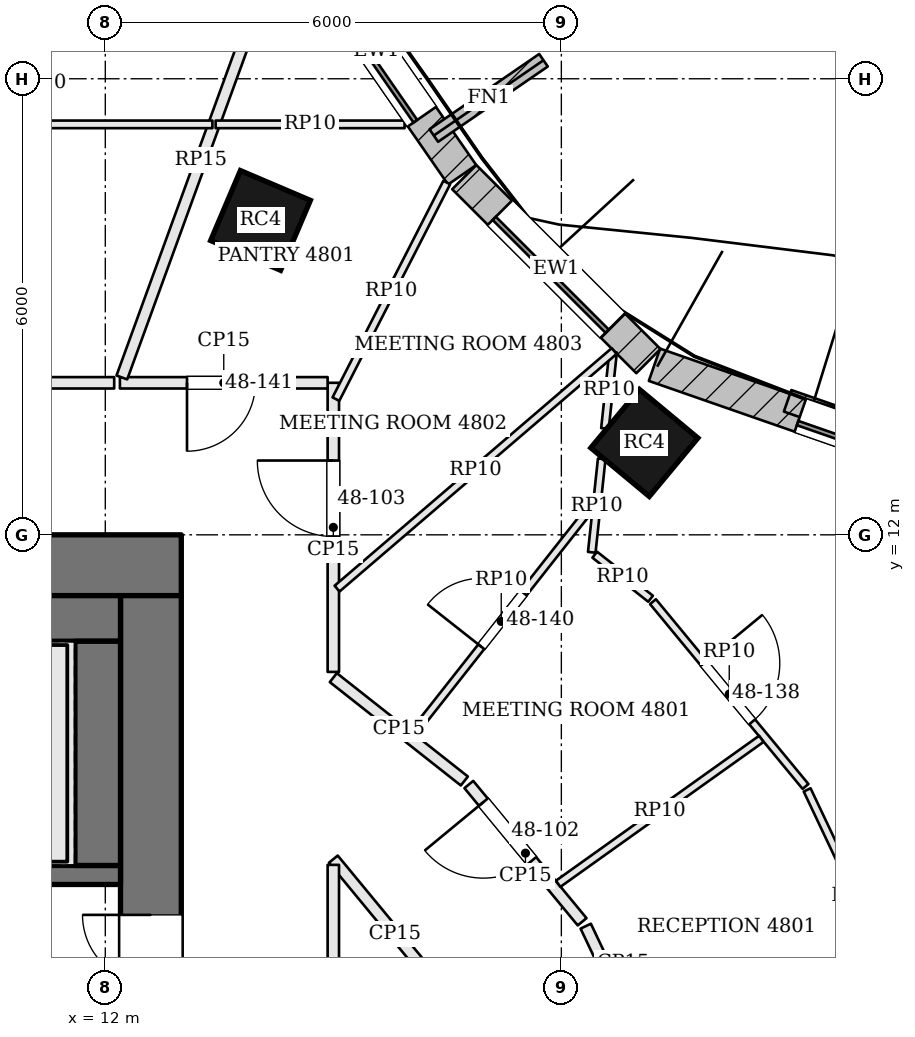
"""IFC4 building model, lengths in metres.
Left out: names, types, materials, properties, quantities, classifications, styles, units other than length and angle.
Written with IfcOpenShell. Run it as: python <this file> out.ifc"""

import sys

from ifc_helpers import new_model, si_unit, direction, frame, frame_2d, origin, origin_2d, place, context, subcontext, project, spatial, rectangle, extrude, element, fill, save


model = new_model("IFC4")
c1 = context("Model", 3, precision=1e-05, world=origin(), true_north=direction((0.0, 1.0)))
c2 = subcontext(c1, "Body", "Model", "MODEL_VIEW")
j1 = project(units=[si_unit("LENGTHUNIT", "METRE"), si_unit("PLANEANGLEUNIT", "RADIAN")], contexts=[c1])
p1 = place(None, origin())
s1 = spatial("IfcSite", under=j1, at=p1, CompositionType="ELEMENT")
p2 = place(p1, origin())
s2 = spatial("IfcBuilding", under=s1, at=p2, CompositionType="ELEMENT")
p3 = place(p2, frame((0.0, 0.0, 197.4)))
s3 = spatial("IfcBuildingStorey", under=s2, at=p3, CompositionType="ELEMENT", Elevation=197.4)
p4 = place(p3, frame((-13.0, 11.6, 0.0), z_axis=(0.0, 0.0, 1.0), x_axis=(1.0, 0.0, 0.0)))
e1 = element("IfcWall", 1, at=p4, inside=s3, PredefinedType="SHEAR", context=c2, shape_type="SweptSolid", body=[
    extrude(rectangle(XDim=26.0, YDim=0.8, at=frame_2d((13.0, 0.0))), origin(), (0.0, 0.0, 1.0), 3.9),
])
p5 = place(p4, frame((8.975, 0.0, 0.0)))
e2 = element("IfcOpeningElement", 2, at=p5, cuts=e1, PredefinedType="OPENING", context=c2, shape_type="SweptSolid", body=[
    extrude(rectangle(XDim=0.7, YDim=2.1, at=frame_2d((0.35, 1.05))), frame((0.0, 0.41, 0.0), z_axis=(0.0, -1.0, 0.0), x_axis=(1.0, 0.0, 0.0)), (0.0, 0.0, 1.0), 0.82),
])
p6 = place(p4, frame((11.025, 0.0, 0.0)))
e3 = element("IfcOpeningElement", 3, at=p6, cuts=e1, PredefinedType="OPENING", context=c2, shape_type="SweptSolid", body=[
    extrude(rectangle(XDim=0.7, YDim=2.1, at=frame_2d((0.35, 1.05))), frame((0.0, 0.41, 0.0), z_axis=(0.0, -1.0, 0.0), x_axis=(1.0, 0.0, 0.0)), (0.0, 0.0, 1.0), 0.82),
])
p7 = place(p4, frame((12.925, 0.0, 0.0)))
e4 = element("IfcOpeningElement", 4, at=p7, cuts=e1, PredefinedType="OPENING", context=c2, shape_type="SweptSolid", body=[
    extrude(rectangle(XDim=1.0, YDim=2.1, at=frame_2d((0.5, 1.05))), frame((0.0, 0.41, 0.0), z_axis=(0.0, -1.0, 0.0), x_axis=(1.0, 0.0, 0.0)), (0.0, 0.0, 1.0), 0.82),
])
p8 = place(p4, frame((15.775, 0.0, 0.0)))
e5 = element("IfcOpeningElement", 5, at=p8, cuts=e1, PredefinedType="OPENING", context=c2, shape_type="SweptSolid", body=[
    extrude(rectangle(XDim=1.0, YDim=2.1, at=frame_2d((0.5, 1.05))), frame((0.0, 0.41, 0.0), z_axis=(0.0, -1.0, 0.0), x_axis=(1.0, 0.0, 0.0)), (0.0, 0.0, 1.0), 0.82),
])
p9 = place(p3, frame((12.6, -2.2, 0.0), z_axis=(0.0, 0.0, 1.0), x_axis=(0.0, 1.0, 0.0)))
e6 = element("IfcWall", 6, at=p9, inside=s3, PredefinedType="SHEAR", context=c2, shape_type="SweptSolid", body=[
    extrude(rectangle(XDim=13.4, YDim=0.8, at=frame_2d((6.7, 0.0))), origin(), (0.0, 0.0, 1.0), 3.9),
])
p10 = place(p9, frame((7.4, 0.0, 0.0)))
e7 = element("IfcOpeningElement", 7, at=p10, cuts=e6, PredefinedType="OPENING", context=c2, shape_type="SweptSolid", body=[
    extrude(rectangle(XDim=1.8, YDim=2.1, at=frame_2d((0.9, 1.05))), frame((0.0, 0.41, 0.0), z_axis=(0.0, -1.0, 0.0), x_axis=(1.0, 0.0, 0.0)), (0.0, 0.0, 1.0), 0.82),
])
for number, where, z_axis, x_axis in (
    (8, (19.092, 13.209, 0.0), (0.0, 0.0, 1.0), (-0.769, 0.639, 0.0)),
    (9, (14.042, 16.136, 0.0), (0.0, 0.0, 1.0), (-0.92, 0.392, 0.0)),
):
    element("IfcColumn", number, at=place(p3, frame(where, z_axis=z_axis, x_axis=x_axis)), inside=s3, PredefinedType="COLUMN", context=c2, shape_type="SweptSolid", body=[
        extrude(rectangle(XDim=1.0, YDim=1.0, at=origin_2d()), origin(), (0.0, 0.0, 1.0), 3.9),
    ])
p11 = place(p3, frame((24.761, 12.31, 0.0), z_axis=(0.0, 0.0, 1.0), x_axis=(-0.944397305248, 0.328806523414, 0.0)))
e10 = element("IfcWall", 10, at=p11, inside=s3, PredefinedType="SOLIDWALL", context=c2, shape_type="SweptSolid", body=[
    extrude(rectangle(XDim=5.862, YDim=0.45, at=frame_2d((2.931, 0.0))), origin(), (0.0, 0.0, 1.0), 3.7),
])
p12 = place(p11, frame((2.031, 0.0, 0.9)))
e11 = element("IfcOpeningElement", 11, at=p12, cuts=e10, PredefinedType="OPENING", context=c2, shape_type="SweptSolid", body=[
    extrude(rectangle(XDim=1.8, YDim=2.3, at=frame_2d((0.9, 1.15))), frame((0.0, 0.235, 0.0), z_axis=(0.0, -1.0, 0.0), x_axis=(1.0, 0.0, 0.0)), (0.0, 0.0, 1.0), 0.47),
])
p13 = place(p3, frame((19.145, 14.285, 0.0), z_axis=(0.0, 0.0, 1.0), x_axis=(-0.707427521052, 0.706785895769, 0.0)))
e12 = element("IfcWall", 12, at=p13, inside=s3, PredefinedType="SOLIDWALL", context=c2, shape_type="SweptSolid", body=[
    extrude(rectangle(XDim=3.425, YDim=0.45, at=frame_2d((1.712, 0.0))), origin(), (0.0, 0.0, 1.0), 3.7),
])
p14 = place(p13, frame((0.662, 0.0, 0.9)))
e13 = element("IfcOpeningElement", 13, at=p14, cuts=e12, PredefinedType="OPENING", context=c2, shape_type="SweptSolid", body=[
    extrude(rectangle(XDim=2.1, YDim=2.3, at=frame_2d((1.05, 1.15))), frame((0.0, 0.235, 0.0), z_axis=(0.0, -1.0, 0.0), x_axis=(1.0, 0.0, 0.0)), (0.0, 0.0, 1.0), 0.47),
])
p15 = place(p3, frame((16.695, 16.737, 0.0), z_axis=(0.0, 0.0, 1.0), x_axis=(-0.569652445465, 0.821885692402, 0.0)))
e14 = element("IfcWall", 14, at=p15, inside=s3, PredefinedType="SOLIDWALL", context=c2, shape_type="SweptSolid", body=[
    extrude(rectangle(XDim=3.959, YDim=0.45, at=frame_2d((1.979, 0.0))), origin(), (0.0, 0.0, 1.0), 3.7),
])
p16 = place(p15, frame((0.929, 0.0, 0.9)))
e15 = element("IfcOpeningElement", 15, at=p16, cuts=e14, PredefinedType="OPENING", context=c2, shape_type="SweptSolid", body=[
    extrude(rectangle(XDim=2.1, YDim=2.3, at=frame_2d((1.05, 1.15))), frame((0.0, 0.235, 0.0), z_axis=(0.0, -1.0, 0.0), x_axis=(1.0, 0.0, 0.0)), (0.0, 0.0, 1.0), 0.47),
])
p17 = place(p3, frame((16.322, 17.253, 0.0), z_axis=(0.0, 0.0, 1.0), x_axis=(0.824440606412, 0.565948483962, 0.0)))
e16 = element("IfcWall", 16, at=p17, inside=s3, PredefinedType="SOLIDWALL", context=c2, shape_type="SweptSolid", body=[
    extrude(rectangle(XDim=1.75, YDim=0.2, at=frame_2d((0.875, 0.0))), origin(), (0.0, 0.0, 1.0), 3.7),
])
p18 = place(p3, frame((24.605, 12.5, 3.9), z_axis=(0.0, 0.0, 1.0), x_axis=(-0.944373295981, 0.328875474668, 0.0)))
e17 = element("IfcWall", 17, at=p18, inside=s3, PredefinedType="PARAPET", context=c2, shape_type="SweptSolid", body=[
    extrude(rectangle(XDim=3.842, YDim=0.3, at=frame_2d((1.921, 0.0))), origin(), (0.0, 0.0, 1.0), 1.1),
])
p19 = place(p3, frame((12.2, 7.525, 0.0), z_axis=(0.0, 0.0, 1.0), x_axis=(-1.0, 0.0, 0.0)))
e18 = element("IfcWall", 18, at=p19, inside=s3, PredefinedType="SOLIDWALL", context=c2, shape_type="SweptSolid", body=[
    extrude(rectangle(XDim=7.1, YDim=0.25, at=frame_2d((3.55, 0.0))), origin(), (0.0, 0.0, 1.0), 3.7),
])
p20 = place(p19, frame((5.8, 0.0, 0.0)))
e19 = element("IfcOpeningElement", 19, at=p20, cuts=e18, PredefinedType="OPENING", context=c2, shape_type="SweptSolid", body=[
    extrude(rectangle(XDim=1.2, YDim=2.1, at=frame_2d((0.6, 1.05))), frame((0.0, 0.135, 0.0), z_axis=(0.0, -1.0, 0.0), x_axis=(1.0, 0.0, 0.0)), (0.0, 0.0, 1.0), 0.27),
])
p21 = place(p3, frame((12.2, 10.9, 0.0), z_axis=(0.0, 0.0, 1.0), x_axis=(-1.0, 0.0, 0.0)))
e20 = element("IfcWall", 20, at=p21, inside=s3, PredefinedType="SOLIDWALL", context=c2, shape_type="SweptSolid", body=[
    extrude(rectangle(XDim=7.1, YDim=0.6, at=frame_2d((3.55, 0.0))), origin(), (0.0, 0.0, 1.0), 3.7),
])
p22 = place(p3, frame((11.9, 10.6, 0.0), z_axis=(0.0, 0.0, 1.0), x_axis=(0.0, -1.0, 0.0)))
e21 = element("IfcWall", 21, at=p22, inside=s3, PredefinedType="SOLIDWALL", context=c2, shape_type="SweptSolid", body=[
    extrude(rectangle(XDim=2.95, YDim=0.6, at=frame_2d((1.475, 0.0))), origin(), (0.0, 0.0, 1.0), 3.7),
])
p23 = place(p3, frame((19.305, 4.773, 0.0), z_axis=(0.0, 0.0, 1.0), x_axis=(-0.428173054138, 0.903696760927, 0.0)))
e22 = element("IfcWall", 22, at=p23, inside=s3, PredefinedType="PARTITIONING", context=c2, shape_type="SweptSolid", body=[
    extrude(rectangle(XDim=2.3, YDim=0.15, at=frame_2d((1.15, 0.0))), origin(), (0.0, 0.0, 1.0), 3.084),
])
p24 = place(p23, frame((0.65, 0.0, 0.0)))
e23 = element("IfcOpeningElement", 23, at=p24, cuts=e22, PredefinedType="OPENING", context=c2, shape_type="SweptSolid", body=[
    extrude(rectangle(XDim=1.0, YDim=2.1, at=frame_2d((0.5, 1.05))), frame((0.0, 0.085, 0.0), z_axis=(0.0, -1.0, 0.0), x_axis=(1.0, 0.0, 0.0)), (0.0, 0.0, 1.0), 0.17),
])
p25 = place(p3, frame((18.273, 6.909, 0.0), z_axis=(0.0, 0.0, 1.0), x_axis=(-0.63653648943, 0.771246586783, 0.0)))
e24 = element("IfcWall", 24, at=p25, inside=s3, PredefinedType="PARTITIONING", context=c2, shape_type="SweptSolid", body=[
    extrude(rectangle(XDim=2.342, YDim=0.15, at=frame_2d((1.171, 0.0))), origin(), (0.0, 0.0, 1.0), 3.084),
])
p26 = place(p25, frame((1.041, 0.0, 0.0)))
e25 = element("IfcOpeningElement", 25, at=p26, cuts=e24, PredefinedType="OPENING", context=c2, shape_type="SweptSolid", body=[
    extrude(rectangle(XDim=1.0, YDim=2.4, at=frame_2d((0.5, 1.2))), frame((0.0, 0.085, 0.0), z_axis=(0.0, -1.0, 0.0), x_axis=(1.0, 0.0, 0.0)), (0.0, 0.0, 1.0), 0.17),
])
p27 = place(p3, frame((16.724, 8.761, 0.0), z_axis=(0.0, 0.0, 1.0), x_axis=(-0.785124633057, 0.619337800047, 0.0)))
e26 = element("IfcWall", 26, at=p27, inside=s3, PredefinedType="PARTITIONING", context=c2, shape_type="SweptSolid", body=[
    extrude(rectangle(XDim=2.196, YDim=0.15, at=frame_2d((1.098, 0.0))), origin(), (0.0, 0.0, 1.0), 3.084),
])
p28 = place(p3, frame((15.0, 10.196, 0.0), z_axis=(0.0, 0.0, 1.0), x_axis=(0.0, 1.0, 0.0)))
e27 = element("IfcWall", 27, at=p28, inside=s3, PredefinedType="PARTITIONING", context=c2, shape_type="SweptSolid", body=[
    extrude(rectangle(XDim=3.804, YDim=0.15, at=frame_2d((1.902, 0.0))), origin(), (0.0, 0.0, 1.0), 3.084),
])
p29 = place(p28, frame((1.781, 0.0, 0.0)))
e28 = element("IfcOpeningElement", 28, at=p29, cuts=e27, PredefinedType="OPENING", context=c2, shape_type="SweptSolid", body=[
    extrude(rectangle(XDim=1.0, YDim=2.4, at=frame_2d((0.5, 1.2))), frame((0.0, 0.085, 0.0), z_axis=(0.0, -1.0, 0.0), x_axis=(1.0, 0.0, 0.0)), (0.0, 0.0, 1.0), 0.17),
])
p30 = place(p3, frame((14.925, 14.0, 0.0), z_axis=(0.0, 0.0, 1.0), x_axis=(-1.0, 0.0, 0.0)))
e29 = element("IfcWall", 29, at=p30, inside=s3, PredefinedType="PARTITIONING", context=c2, shape_type="SweptSolid", body=[
    extrude(rectangle(XDim=2.733, YDim=0.15, at=frame_2d((1.366, 0.0))), origin(), (0.0, 0.0, 1.0), 3.084),
])
p31 = place(p30, frame((0.95, 0.0, 0.0)))
e30 = element("IfcOpeningElement", 30, at=p31, cuts=e29, PredefinedType="OPENING", context=c2, shape_type="SweptSolid", body=[
    extrude(rectangle(XDim=0.9, YDim=2.1, at=frame_2d((0.45, 1.05))), frame((0.0, 0.085, 0.0), z_axis=(0.0, -1.0, 0.0), x_axis=(1.0, 0.0, 0.0)), (0.0, 0.0, 1.0), 0.17),
])
p32 = place(p3, frame((14.301, 19.789, 0.0), z_axis=(0.0, 0.0, 1.0), x_axis=(-0.342258353436, -0.9396058852, 0.0)))
e31 = element("IfcWall", 31, at=p32, inside=s3, PredefinedType="PARTITIONING", context=c2, shape_type="SweptSolid", body=[
    extrude(rectangle(XDim=6.086, YDim=0.15, at=frame_2d((3.043, 0.0))), origin(), (0.0, 0.0, 1.0), 3.084),
])
p33 = place(p3, frame((12.117, 14.0, 0.0), z_axis=(0.0, 0.0, 1.0), x_axis=(-1.0, 0.0, 0.0)))
e32 = element("IfcWall", 32, at=p33, inside=s3, PredefinedType="PARTITIONING", context=c2, shape_type="SweptSolid", body=[
    extrude(rectangle(XDim=15.289, YDim=0.15, at=frame_2d((7.644, 0.0))), origin(), (0.0, 0.0, 1.0), 3.084),
])
p34 = place(p33, frame((2.0, 0.0, 0.0)))
e33 = element("IfcOpeningElement", 33, at=p34, cuts=e32, PredefinedType="OPENING", context=c2, shape_type="SweptSolid", body=[
    extrude(rectangle(XDim=1.8, YDim=2.1, at=frame_2d((0.9, 1.05))), frame((0.0, 0.085, 0.0), z_axis=(0.0, -1.0, 0.0), x_axis=(1.0, 0.0, 0.0)), (0.0, 0.0, 1.0), 0.17),
])
p35 = place(p33, frame((8.603, 0.0, 0.0)))
e34 = element("IfcOpeningElement", 34, at=p35, cuts=e32, PredefinedType="OPENING", context=c2, shape_type="SweptSolid", body=[
    extrude(rectangle(XDim=1.0, YDim=2.4, at=frame_2d((0.5, 1.2))), frame((0.0, 0.085, 0.0), z_axis=(0.0, -1.0, 0.0), x_axis=(1.0, 0.0, 0.0)), (0.0, 0.0, 1.0), 0.17),
])
p36 = place(p3, frame((15.0, 7.733, 0.0), z_axis=(0.0, 0.0, 1.0), x_axis=(0.636601263488, -0.771193121938, 0.0)))
e35 = element("IfcWall", 35, at=p36, inside=s3, PredefinedType="PARTITIONING", context=c2, shape_type="SweptSolid", body=[
    extrude(rectangle(XDim=2.545, YDim=0.15, at=frame_2d((1.272, 0.0))), origin(), (0.0, 0.0, 1.0), 3.084),
])
p37 = place(p3, frame((15.0, -4.925, 0.0), z_axis=(0.0, 0.0, 1.0), x_axis=(0.0, 1.0, 0.0)))
e36 = element("IfcWall", 36, at=p37, inside=s3, PredefinedType="PARTITIONING", context=c2, shape_type="SweptSolid", body=[
    extrude(rectangle(XDim=12.583, YDim=0.15, at=frame_2d((6.292, 0.0))), origin(), (0.0, 0.0, 1.0), 3.084),
])
p38 = place(p37, frame((8.291, 0.0, 0.0)))
e37 = element("IfcOpeningElement", 37, at=p38, cuts=e36, PredefinedType="OPENING", context=c2, shape_type="SweptSolid", body=[
    extrude(rectangle(XDim=1.0, YDim=2.1, at=frame_2d((0.5, 1.05))), frame((0.0, 0.085, 0.0), z_axis=(0.0, -1.0, 0.0), x_axis=(1.0, 0.0, 0.0)), (0.0, 0.0, 1.0), 0.17),
])
p39 = place(p3, frame((13.452, 17.4, 0.0), z_axis=(0.0, 0.0, 1.0), x_axis=(1.0, 0.0, 0.0)))
e38 = element("IfcWall", 38, at=p39, inside=s3, PredefinedType="PARTITIONING", context=c2, shape_type="SweptSolid", body=[
    extrude(rectangle(XDim=2.486, YDim=0.1, at=frame_2d((1.243, 0.0))), origin(), (0.0, 0.0, 1.0), 3.084),
])
p40 = place(p3, frame((18.681, 14.404, 0.0), z_axis=(0.0, 0.0, 1.0), x_axis=(-0.106080909628, -0.994357501411, 0.0)))
e39 = element("IfcWall", 39, at=p40, inside=s3, PredefinedType="PARTITIONING", context=c2, shape_type="SweptSolid", body=[
    extrude(rectangle(XDim=1.01, YDim=0.1, at=frame_2d((0.505, 0.0))), origin(), (0.0, 0.0, 1.0), 3.084),
])
p41 = place(p3, frame((18.531, 12.999, 0.0), z_axis=(0.0, 0.0, 1.0), x_axis=(-0.106031141527, -0.994362809555, 0.0)))
e40 = element("IfcWall", 40, at=p41, inside=s3, PredefinedType="PARTITIONING", context=c2, shape_type="SweptSolid", body=[
    extrude(rectangle(XDim=1.237, YDim=0.1, at=frame_2d((0.618, 0.0))), origin(), (0.0, 0.0, 1.0), 3.084),
])
p42 = place(p3, frame((18.439, 11.739, 0.0), z_axis=(0.0, 0.0, 1.0), x_axis=(0.784976275707, -0.619525823979, 0.0)))
e41 = element("IfcWall", 41, at=p42, inside=s3, PredefinedType="PARTITIONING", context=c2, shape_type="SweptSolid", body=[
    extrude(rectangle(XDim=0.936, YDim=0.1, at=frame_2d((0.468, 0.0))), origin(), (0.0, 0.0, 1.0), 3.084),
])
p43 = place(p3, frame((19.206, 11.121, 0.0), z_axis=(0.0, 0.0, 1.0), x_axis=(0.636597206989, -0.771196470462, 0.0)))
e42 = element("IfcWall", 42, at=p43, inside=s3, PredefinedType="PARTITIONING", context=c2, shape_type="SweptSolid", body=[
    extrude(rectangle(XDim=3.152, YDim=0.1, at=frame_2d((1.576, 0.0))), origin(), (0.0, 0.0, 1.0), 3.084),
])
p44 = place(p43, frame((1.05, 0.0, 0.0)))
e43 = element("IfcOpeningElement", 43, at=p44, cuts=e42, PredefinedType="OPENING", context=c2, shape_type="SweptSolid", body=[
    extrude(rectangle(XDim=1.0, YDim=2.4, at=frame_2d((0.5, 1.2))), frame((0.0, 0.06, 0.0), z_axis=(0.0, -1.0, 0.0), x_axis=(1.0, 0.0, 0.0)), (0.0, 0.0, 1.0), 0.12),
])
p45 = place(p3, frame((21.234, 8.644, 0.0), z_axis=(0.0, 0.0, 1.0), x_axis=(0.428147386965, -0.903708921631, 0.0)))
e44 = element("IfcWall", 44, at=p45, inside=s3, PredefinedType="PARTITIONING", context=c2, shape_type="SweptSolid", body=[
    extrude(rectangle(XDim=3.095, YDim=0.1, at=frame_2d((1.547, 0.0))), origin(), (0.0, 0.0, 1.0), 3.084),
])
p46 = place(p45, frame((1.6, 0.0, 0.0)))
e45 = element("IfcOpeningElement", 45, at=p46, cuts=e44, PredefinedType="OPENING", context=c2, shape_type="SweptSolid", body=[
    extrude(rectangle(XDim=1.0, YDim=2.1, at=frame_2d((0.5, 1.05))), frame((0.0, 0.06, 0.0), z_axis=(0.0, -1.0, 0.0), x_axis=(1.0, 0.0, 0.0)), (0.0, 0.0, 1.0), 0.12),
])
p47 = place(p3, frame((17.958, 7.409, 0.0), z_axis=(0.0, 0.0, 1.0), x_axis=(0.814074945817, 0.58075983211, 0.0)))
e46 = element("IfcWall", 46, at=p47, inside=s3, PredefinedType="PARTITIONING", context=c2, shape_type="SweptSolid", body=[
    extrude(rectangle(XDim=3.284, YDim=0.1, at=frame_2d((1.642, 0.0))), origin(), (0.0, 0.0, 1.0), 3.084),
])
p48 = place(p3, frame((16.049, 9.389, 0.0), z_axis=(0.0, 0.0, 1.0), x_axis=(0.619061036151, 0.785342876405, 0.0)))
e47 = element("IfcWall", 47, at=p48, inside=s3, PredefinedType="PARTITIONING", context=c2, shape_type="SweptSolid", body=[
    extrude(rectangle(XDim=3.747, YDim=0.1, at=frame_2d((1.874, 0.0))), origin(), (0.0, 0.0, 1.0), 3.084),
])
p49 = place(p48, frame((1.45, 0.0, 0.0)))
e48 = element("IfcOpeningElement", 48, at=p49, cuts=e47, PredefinedType="OPENING", context=c2, shape_type="SweptSolid", body=[
    extrude(rectangle(XDim=0.9, YDim=2.1, at=frame_2d((0.45, 1.05))), frame((0.0, 0.06, 0.0), z_axis=(0.0, -1.0, 0.0), x_axis=(1.0, 0.0, 0.0)), (0.0, 0.0, 1.0), 0.12),
])
p50 = place(p3, frame((15.049, 11.292, 0.0), z_axis=(0.0, 0.0, 1.0), x_axis=(0.759202764933, 0.650854178536, 0.0)))
e49 = element("IfcWall", 49, at=p50, inside=s3, PredefinedType="PARTITIONING", context=c2, shape_type="SweptSolid", body=[
    extrude(rectangle(XDim=4.802, YDim=0.1, at=frame_2d((2.401, 0.0))), origin(), (0.0, 0.0, 1.0), 3.084),
])
p51 = place(p3, frame((15.034, 13.785, 0.0), z_axis=(0.0, 0.0, 1.0), x_axis=(0.455523603198, 0.890223706115, 0.0)))
e50 = element("IfcWall", 50, at=p51, inside=s3, PredefinedType="PARTITIONING", context=c2, shape_type="SweptSolid", body=[
    extrude(rectangle(XDim=3.201, YDim=0.1, at=frame_2d((1.6, 0.0))), origin(), (0.0, 0.0, 1.0), 3.084),
])
p52 = place(p3, frame((8.884, 17.4, 0.0), z_axis=(0.0, 0.0, 1.0), x_axis=(1.0, 0.0, 0.0)))
e51 = element("IfcWall", 51, at=p52, inside=s3, PredefinedType="PARTITIONING", context=c2, shape_type="SweptSolid", body=[
    extrude(rectangle(XDim=4.525, YDim=0.1, at=frame_2d((2.263, 0.0))), origin(), (0.0, 0.0, 1.0), 3.084),
])
p53 = place(p52, frame((0.782, 0.0, 0.0)))
e52 = element("IfcOpeningElement", 52, at=p53, cuts=e51, PredefinedType="OPENING", context=c2, shape_type="SweptSolid", body=[
    extrude(rectangle(XDim=1.0, YDim=2.1, at=frame_2d((0.5, 1.05))), frame((0.0, 0.06, 0.0), z_axis=(0.0, -1.0, 0.0), x_axis=(1.0, 0.0, 0.0)), (0.0, 0.0, 1.0), 0.12),
])
p54 = place(p12, origin())
e53 = element("IfcWindow", 53, at=p54, inside=s3, PartitioningType="SINGLE_PANEL", PredefinedType="WINDOW", context=c2, shape_type="SweptSolid", body=[
    extrude(rectangle(XDim=1.8, YDim=2.3, at=frame_2d((0.9, 1.15))), frame((0.0, 0.135, 0.0), z_axis=(0.0, -1.0, 0.0), x_axis=(1.0, 0.0, 0.0)), (0.0, 0.0, 1.0), 0.06),
])
fill(e11, e53)
p55 = place(p14, origin())
e54 = element("IfcWindow", 54, at=p55, inside=s3, PartitioningType="SINGLE_PANEL", PredefinedType="WINDOW", context=c2, shape_type="SweptSolid", body=[
    extrude(rectangle(XDim=2.1, YDim=2.3, at=frame_2d((1.05, 1.15))), frame((0.0, 0.135, 0.0), z_axis=(0.0, -1.0, 0.0), x_axis=(1.0, 0.0, 0.0)), (0.0, 0.0, 1.0), 0.06),
])
fill(e13, e54)
p56 = place(p16, origin())
e55 = element("IfcWindow", 55, at=p56, inside=s3, PartitioningType="SINGLE_PANEL", PredefinedType="WINDOW", context=c2, shape_type="SweptSolid", body=[
    extrude(rectangle(XDim=2.1, YDim=2.3, at=frame_2d((1.05, 1.15))), frame((0.0, 0.135, 0.0), z_axis=(0.0, -1.0, 0.0), x_axis=(1.0, 0.0, 0.0)), (0.0, 0.0, 1.0), 0.06),
])
fill(e15, e55)
p57 = place(p10, origin())
e56 = element("IfcDoor", 56, at=p57, inside=s3, OperationType="DOUBLE_DOOR_SINGLE_SWING", PredefinedType="DOOR", context=c2, shape_type="SweptSolid", body=[
    extrude(rectangle(XDim=1.8, YDim=2.1, at=frame_2d((0.9, 1.05))), frame((0.0, 0.025, 0.0), z_axis=(0.0, -1.0, 0.0), x_axis=(1.0, 0.0, 0.0)), (0.0, 0.0, 1.0), 0.05),
])
fill(e7, e56)
p58 = place(p26, origin())
e57 = element("IfcDoor", 57, at=p58, inside=s3, OperationType="SINGLE_SWING_RIGHT", PredefinedType="DOOR", context=c2, shape_type="SweptSolid", body=[
    extrude(rectangle(XDim=1.0, YDim=2.4, at=frame_2d((0.5, 1.2))), frame((0.0, 0.025, 0.0), z_axis=(0.0, -1.0, 0.0), x_axis=(1.0, 0.0, 0.0)), (0.0, 0.0, 1.0), 0.05),
])
fill(e25, e57)
p59 = place(p29, origin())
e58 = element("IfcDoor", 58, at=p59, inside=s3, OperationType="SINGLE_SWING_RIGHT", PredefinedType="DOOR", context=c2, shape_type="SweptSolid", body=[
    extrude(rectangle(XDim=1.0, YDim=2.4, at=frame_2d((0.5, 1.2))), frame((0.0, 0.025, 0.0), z_axis=(0.0, -1.0, 0.0), x_axis=(1.0, 0.0, 0.0)), (0.0, 0.0, 1.0), 0.05),
])
fill(e28, e58)
p60 = place(p44, origin())
e59 = element("IfcDoor", 59, at=p60, inside=s3, OperationType="SINGLE_SWING_LEFT", PredefinedType="DOOR", context=c2, shape_type="SweptSolid", body=[
    extrude(rectangle(XDim=1.0, YDim=2.4, at=frame_2d((0.5, 1.2))), frame((0.0, 0.025, 0.0), z_axis=(0.0, -1.0, 0.0), x_axis=(1.0, 0.0, 0.0)), (0.0, 0.0, 1.0), 0.05),
])
fill(e43, e59)
p61 = place(p49, origin())
e60 = element("IfcDoor", 60, at=p61, inside=s3, OperationType="SINGLE_SWING_LEFT", PredefinedType="DOOR", context=c2, shape_type="SweptSolid", body=[
    extrude(rectangle(XDim=0.9, YDim=2.1, at=frame_2d((0.45, 1.05))), frame((0.0, 0.025, 0.0), z_axis=(0.0, -1.0, 0.0), x_axis=(1.0, 0.0, 0.0)), (0.0, 0.0, 1.0), 0.05),
])
fill(e48, e60)
p62 = place(p31, origin())
e61 = element("IfcDoor", 61, at=p62, inside=s3, OperationType="SINGLE_SWING_RIGHT", PredefinedType="DOOR", context=c2, shape_type="SweptSolid", body=[
    extrude(rectangle(XDim=0.9, YDim=2.1, at=frame_2d((0.45, 1.05))), frame((0.0, 0.025, 0.0), z_axis=(0.0, -1.0, 0.0), x_axis=(1.0, 0.0, 0.0)), (0.0, 0.0, 1.0), 0.05),
])
fill(e30, e61)
save(model, sys.argv[1])
